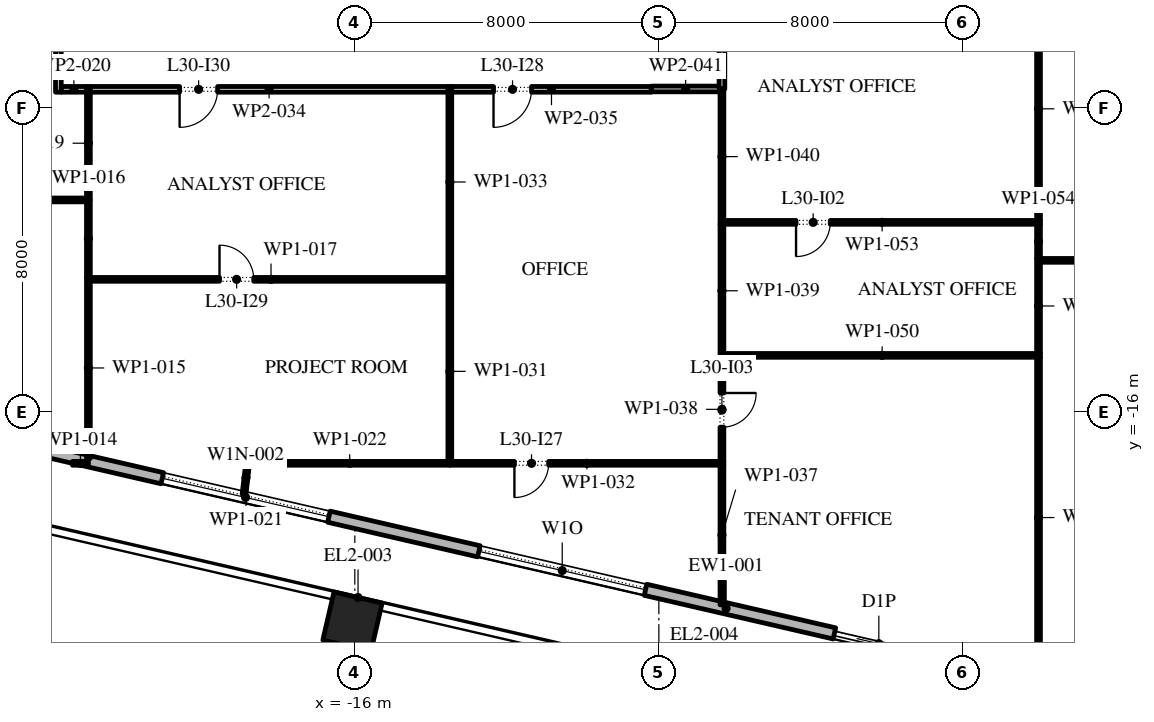
"""IFC4 building model, lengths in metres.
Left out: names, types, materials, properties, quantities, classifications, styles, units other than length and angle.
Written with IfcOpenShell. Run it as: python <this file> out.ifc"""

import sys

from ifc_helpers import new_model, si_unit, direction, frame, frame_2d, origin, origin_2d, place, context, subcontext, project, spatial, rectangle, extrude, element, fill, save


model = new_model("IFC4")
c1 = context("Model", 3, precision=1e-05, world=origin(), true_north=direction((0.0, 1.0)))
c2 = subcontext(c1, "Body", "Model", "MODEL_VIEW")
j1 = project(units=[si_unit("LENGTHUNIT", "METRE"), si_unit("PLANEANGLEUNIT", "RADIAN")], contexts=[c1])
p1 = place(None, origin())
s1 = spatial("IfcSite", under=j1, at=p1, CompositionType="ELEMENT")
p2 = place(p1, origin())
s2 = spatial("IfcBuilding", under=s1, at=p2, CompositionType="ELEMENT")
p3 = place(p2, frame((0.0, 0.0, 139.2)))
s3 = spatial("IfcBuildingStorey", under=s2, at=p3, CompositionType="ELEMENT", Elevation=139.2)
p4 = place(p3, frame((-16.061, -21.505, 0.0), z_axis=(0.0, 0.0, 1.0), x_axis=(0.974370064785, -0.224951054344, 0.0)))
e1 = element("IfcColumn", 1, at=p4, inside=s3, PredefinedType="COLUMN", context=c2, shape_type="SweptSolid", body=[
    extrude(rectangle(XDim=1.3, YDim=1.3, at=origin_2d()), origin(), (0.0, 0.0, 1.0), 4.2),
])
p5 = place(p3, frame((-31.078, -15.421, 0.0), z_axis=(0.0, 0.0, 1.0), x_axis=(0.974370456532, -0.224949357493, 0.0)))
e2 = element("IfcWall", 2, at=p5, inside=s3, PredefinedType="STANDARD", context=c2, shape_type="SweptSolid", body=[
    extrude(rectangle(XDim=51.0, YDim=0.3, at=frame_2d((25.5, 0.0))), origin(), (0.0, 0.0, 1.0), 4.0),
])
p6 = place(p5, frame((1.875, 0.0, 0.45)))
e3 = element("IfcOpeningElement", 3, at=p6, cuts=e2, PredefinedType="OPENING", context=c2, shape_type="SweptSolid", body=[
    extrude(rectangle(XDim=4.5, YDim=2.65, at=frame_2d((2.25, 1.325))), frame((0.0, 0.16, 0.0), z_axis=(0.0, -1.0, 0.0), x_axis=(1.0, 0.0, 0.0)), (0.0, 0.0, 1.0), 0.32),
])
p7 = place(p5, frame((10.275, 0.0, 0.45)))
e4 = element("IfcOpeningElement", 4, at=p7, cuts=e2, PredefinedType="OPENING", context=c2, shape_type="SweptSolid", body=[
    extrude(rectangle(XDim=4.5, YDim=2.525, at=frame_2d((2.25, 1.262))), frame((0.0, 0.16, 0.0), z_axis=(0.0, -1.0, 0.0), x_axis=(1.0, 0.0, 0.0)), (0.0, 0.0, 1.0), 0.32),
])
p8 = place(p5, frame((18.825, 0.0, 0.45)))
e5 = element("IfcOpeningElement", 5, at=p8, cuts=e2, PredefinedType="OPENING", context=c2, shape_type="SweptSolid", body=[
    extrude(rectangle(XDim=4.5, YDim=2.5, at=frame_2d((2.25, 1.25))), frame((0.0, 0.16, 0.0), z_axis=(0.0, -1.0, 0.0), x_axis=(1.0, 0.0, 0.0)), (0.0, 0.0, 1.0), 0.32),
])
p9 = place(p5, frame((28.425, 0.0, 0.0)))
e6 = element("IfcOpeningElement", 6, at=p9, cuts=e2, PredefinedType="OPENING", context=c2, shape_type="SweptSolid", body=[
    extrude(rectangle(XDim=2.4, YDim=2.9, at=frame_2d((1.2, 1.45))), frame((0.0, 0.16, 0.0), z_axis=(0.0, -1.0, 0.0), x_axis=(1.0, 0.0, 0.0)), (0.0, 0.0, 1.0), 0.32),
])
p10 = place(p5, frame((35.925, 0.0, 0.45)))
e7 = element("IfcOpeningElement", 7, at=p10, cuts=e2, PredefinedType="OPENING", context=c2, shape_type="SweptSolid", body=[
    extrude(rectangle(XDim=4.5, YDim=2.45, at=frame_2d((2.25, 1.225))), frame((0.0, 0.16, 0.0), z_axis=(0.0, -1.0, 0.0), x_axis=(1.0, 0.0, 0.0)), (0.0, 0.0, 1.0), 0.32),
])
p11 = place(p5, frame((44.475, 0.0, 0.45)))
e8 = element("IfcOpeningElement", 8, at=p11, cuts=e2, PredefinedType="OPENING", context=c2, shape_type="SweptSolid", body=[
    extrude(rectangle(XDim=4.5, YDim=2.45, at=frame_2d((2.25, 1.225))), frame((0.0, 0.16, 0.0), z_axis=(0.0, -1.0, 0.0), x_axis=(1.0, 0.0, 0.0)), (0.0, 0.0, 1.0), 0.32),
])
p12 = place(p3, frame((-22.82, 37.016, 0.0), z_axis=(0.0, 0.0, 1.0), x_axis=(-0.224953880882, -0.974369412223, 0.0)))
e9 = element("IfcWall", 9, at=p12, inside=s3, PredefinedType="STANDARD", context=c2, shape_type="SweptSolid", body=[
    extrude(rectangle(XDim=49.5, YDim=0.3, at=frame_2d((24.75, 0.0))), origin(), (0.0, 0.0, 1.0), 4.0),
])
p13 = place(p12, frame((1.157, 0.0, 0.45)))
e10 = element("IfcOpeningElement", 10, at=p13, cuts=e9, PredefinedType="OPENING", context=c2, shape_type="SweptSolid", body=[
    extrude(rectangle(XDim=4.5, YDim=3.05, at=frame_2d((2.25, 1.525))), frame((0.0, 0.16, 0.0), z_axis=(0.0, -1.0, 0.0), x_axis=(1.0, 0.0, 0.0)), (0.0, 0.0, 1.0), 0.32),
])
p14 = place(p12, frame((8.121, 0.0, 0.45)))
e11 = element("IfcOpeningElement", 11, at=p14, cuts=e9, PredefinedType="OPENING", context=c2, shape_type="SweptSolid", body=[
    extrude(rectangle(XDim=4.5, YDim=3.05, at=frame_2d((2.25, 1.525))), frame((0.0, 0.16, 0.0), z_axis=(0.0, -1.0, 0.0), x_axis=(1.0, 0.0, 0.0)), (0.0, 0.0, 1.0), 0.32),
])
p15 = place(p12, frame((15.236, 0.0, 0.45)))
e12 = element("IfcOpeningElement", 12, at=p15, cuts=e9, PredefinedType="OPENING", context=c2, shape_type="SweptSolid", body=[
    extrude(rectangle(XDim=4.5, YDim=3.05, at=frame_2d((2.25, 1.525))), frame((0.0, 0.16, 0.0), z_axis=(0.0, -1.0, 0.0), x_axis=(1.0, 0.0, 0.0)), (0.0, 0.0, 1.0), 0.32),
])
p16 = place(p12, frame((23.4, 0.0, 0.0)))
e13 = element("IfcOpeningElement", 13, at=p16, cuts=e9, PredefinedType="OPENING", context=c2, shape_type="SweptSolid", body=[
    extrude(rectangle(XDim=2.4, YDim=3.5, at=frame_2d((1.2, 1.75))), frame((0.0, 0.16, 0.0), z_axis=(0.0, -1.0, 0.0), x_axis=(1.0, 0.0, 0.0)), (0.0, 0.0, 1.0), 0.32),
])
p17 = place(p12, frame((29.464, 0.0, 0.45)))
e14 = element("IfcOpeningElement", 14, at=p17, cuts=e9, PredefinedType="OPENING", context=c2, shape_type="SweptSolid", body=[
    extrude(rectangle(XDim=4.5, YDim=2.875, at=frame_2d((2.25, 1.438))), frame((0.0, 0.16, 0.0), z_axis=(0.0, -1.0, 0.0), x_axis=(1.0, 0.0, 0.0)), (0.0, 0.0, 1.0), 0.32),
])
p18 = place(p12, frame((36.579, 0.0, 0.45)))
e15 = element("IfcOpeningElement", 15, at=p18, cuts=e9, PredefinedType="OPENING", context=c2, shape_type="SweptSolid", body=[
    extrude(rectangle(XDim=4.5, YDim=2.675, at=frame_2d((2.25, 1.337))), frame((0.0, 0.16, 0.0), z_axis=(0.0, -1.0, 0.0), x_axis=(1.0, 0.0, 0.0)), (0.0, 0.0, 1.0), 0.32),
])
p19 = place(p12, frame((43.693, 0.0, 0.45)))
e16 = element("IfcOpeningElement", 16, at=p19, cuts=e9, PredefinedType="OPENING", context=c2, shape_type="SweptSolid", body=[
    extrude(rectangle(XDim=4.5, YDim=3.05, at=frame_2d((2.25, 1.525))), frame((0.0, 0.16, 0.0), z_axis=(0.0, -1.0, 0.0), x_axis=(1.0, 0.0, 0.0)), (0.0, 0.0, 1.0), 0.32),
])
p20 = place(p3, frame((-23.8, -7.575, 0.0), z_axis=(0.0, 0.0, 1.0), x_axis=(0.0, 1.0, 0.0)))
e17 = element("IfcWall", 17, at=p20, inside=s3, PredefinedType="PARTITIONING", context=c2, shape_type="SweptSolid", body=[
    extrude(rectangle(XDim=3.255, YDim=0.15, at=frame_2d((1.627, 0.0))), origin(), (0.0, 0.0, 1.0), 4.0),
])
p21 = place(p20, frame((1.105, 0.0, 0.0)))
e18 = element("IfcOpeningElement", 18, at=p21, cuts=e17, PredefinedType="OPENING", context=c2, shape_type="SweptSolid", body=[
    extrude(rectangle(XDim=1.0, YDim=2.1, at=frame_2d((0.5, 1.05))), frame((0.0, 0.085, 0.0), z_axis=(0.0, -1.0, 0.0), x_axis=(1.0, 0.0, 0.0)), (0.0, 0.0, 1.0), 0.17),
])
p22 = place(p3, frame((-23.43, -17.34, 0.0), z_axis=(0.0, 0.0, 1.0), x_axis=(1.0, 0.0, 0.0)))
e19 = element("IfcWall", 19, at=p22, inside=s3, PredefinedType="PARTITIONING", context=c2, shape_type="SweptSolid", body=[
    extrude(rectangle(XDim=0.42, YDim=0.1, at=frame_2d((0.21, 0.0))), origin(), (0.0, 0.0, 1.0), 4.0),
])
p23 = place(p3, frame((-23.01, -17.212, 0.0), z_axis=(0.0, 0.0, 1.0), x_axis=(0.0, 1.0, 0.0)))
e20 = element("IfcWall", 20, at=p23, inside=s3, PredefinedType="PARTITIONING", context=c2, shape_type="SweptSolid", body=[
    extrude(rectangle(XDim=4.762, YDim=0.1, at=frame_2d((2.381, 0.0))), origin(), (0.0, 0.0, 1.0), 4.0),
])
p24 = place(p3, frame((-23.01, -12.45, 0.0), z_axis=(0.0, 0.0, 1.0), x_axis=(0.0, 1.0, 0.0)))
e21 = element("IfcWall", 21, at=p24, inside=s3, PredefinedType="PARTITIONING", context=c2, shape_type="SweptSolid", body=[
    extrude(rectangle(XDim=2.04, YDim=0.1, at=frame_2d((1.02, 0.0))), origin(), (0.0, 0.0, 1.0), 4.0),
])
p25 = place(p3, frame((-22.96, -12.5, 0.0), z_axis=(0.0, 0.0, 1.0), x_axis=(1.0, 0.0, 0.0)))
e22 = element("IfcWall", 22, at=p25, inside=s3, PredefinedType="PARTITIONING", context=c2, shape_type="SweptSolid", body=[
    extrude(rectangle(XDim=9.51, YDim=0.1, at=frame_2d((4.755, 0.0))), origin(), (0.0, 0.0, 1.0), 4.0),
])
p26 = place(p25, frame((3.4, 0.0, 0.0)))
e23 = element("IfcOpeningElement", 23, at=p26, cuts=e22, PredefinedType="OPENING", context=c2, shape_type="SweptSolid", body=[
    extrude(rectangle(XDim=0.9, YDim=2.1, at=frame_2d((0.45, 1.05))), frame((0.0, 0.06, 0.0), z_axis=(0.0, -1.0, 0.0), x_axis=(1.0, 0.0, 0.0)), (0.0, 0.0, 1.0), 0.12),
])
p27 = place(p3, frame((-23.06, -10.41, 0.0), z_axis=(0.0, 0.0, 1.0), x_axis=(-1.0, 0.0, 0.0)))
e24 = element("IfcWall", 24, at=p27, inside=s3, PredefinedType="PARTITIONING", context=c2, shape_type="SweptSolid", body=[
    extrude(rectangle(XDim=8.97, YDim=0.1, at=frame_2d((4.485, 0.0))), origin(), (0.0, 0.0, 1.0), 4.0),
])
p28 = place(p27, frame((3.92, 0.0, 0.0)))
e25 = element("IfcOpeningElement", 25, at=p28, cuts=e24, PredefinedType="OPENING", context=c2, shape_type="SweptSolid", body=[
    extrude(rectangle(XDim=0.9, YDim=2.1, at=frame_2d((0.45, 1.05))), frame((0.0, 0.06, 0.0), z_axis=(0.0, -1.0, 0.0), x_axis=(1.0, 0.0, 0.0)), (0.0, 0.0, 1.0), 0.12),
])
p29 = place(p3, frame((-23.01, -10.41, 0.0), z_axis=(0.0, 0.0, 1.0), x_axis=(0.0, 1.0, 0.0)))
e26 = element("IfcWall", 26, at=p29, inside=s3, PredefinedType="PARTITIONING", context=c2, shape_type="SweptSolid", body=[
    extrude(rectangle(XDim=2.985, YDim=0.1, at=frame_2d((1.492, 0.0))), origin(), (0.0, 0.0, 1.0), 4.0),
])
p30 = place(p3, frame((-23.06, -7.5, 0.0), z_axis=(0.0, 0.0, 1.0), x_axis=(-1.0, 0.0, 0.0)))
e27 = element("IfcWall", 27, at=p30, inside=s3, PredefinedType="PARTITIONING", context=c2, shape_type="SweptSolid", body=[
    extrude(rectangle(XDim=0.665, YDim=0.15, at=frame_2d((0.333, 0.0))), origin(), (0.0, 0.0, 1.0), 4.0),
])
p31 = place(p3, frame((-18.915, -18.157, 0.0), z_axis=(0.0, 0.0, 1.0), x_axis=(0.11580251051, 0.993272258024, 0.0)))
e28 = element("IfcWall", 28, at=p31, inside=s3, PredefinedType="PARTITIONING", context=c2, shape_type="SweptSolid", body=[
    extrude(rectangle(XDim=0.873, YDim=0.1, at=frame_2d((0.437, 0.0))), origin(), (0.0, 0.0, 1.0), 4.0),
])
p32 = place(p3, frame((-18.77, -17.34, 0.0), z_axis=(0.0, 0.0, 1.0), x_axis=(1.0, 0.0, 0.0)))
e29 = element("IfcWall", 29, at=p32, inside=s3, PredefinedType="PARTITIONING", context=c2, shape_type="SweptSolid", body=[
    extrude(rectangle(XDim=5.27, YDim=0.1, at=frame_2d((2.635, 0.0))), origin(), (0.0, 0.0, 1.0), 4.0),
])
p33 = place(p3, frame((-13.5, -17.29, 0.0), z_axis=(0.0, 0.0, 1.0), x_axis=(0.0, 1.0, 0.0)))
e30 = element("IfcWall", 30, at=p33, inside=s3, PredefinedType="PARTITIONING", context=c2, shape_type="SweptSolid", body=[
    extrude(rectangle(XDim=4.74, YDim=0.1, at=frame_2d((2.37, 0.0))), origin(), (0.0, 0.0, 1.0), 4.0),
])
p34 = place(p3, frame((-13.5, -17.34, 0.0), z_axis=(0.0, 0.0, 1.0), x_axis=(1.0, 0.0, 0.0)))
e31 = element("IfcWall", 31, at=p34, inside=s3, PredefinedType="PARTITIONING", context=c2, shape_type="SweptSolid", body=[
    extrude(rectangle(XDim=7.21, YDim=0.1, at=frame_2d((3.605, 0.0))), origin(), (0.0, 0.0, 1.0), 4.0),
])
p35 = place(p34, frame((1.7, 0.0, 0.0)))
e32 = element("IfcOpeningElement", 32, at=p35, cuts=e31, PredefinedType="OPENING", context=c2, shape_type="SweptSolid", body=[
    extrude(rectangle(XDim=0.9, YDim=2.1, at=frame_2d((0.45, 1.05))), frame((0.0, 0.06, 0.0), z_axis=(0.0, -1.0, 0.0), x_axis=(1.0, 0.0, 0.0)), (0.0, 0.0, 1.0), 0.12),
])
p36 = place(p3, frame((-13.5, -12.45, 0.0), z_axis=(0.0, 0.0, 1.0), x_axis=(0.0, 1.0, 0.0)))
e33 = element("IfcWall", 33, at=p36, inside=s3, PredefinedType="PARTITIONING", context=c2, shape_type="SweptSolid", body=[
    extrude(rectangle(XDim=5.025, YDim=0.1, at=frame_2d((2.512, 0.0))), origin(), (0.0, 0.0, 1.0), 4.0),
])
p37 = place(p3, frame((-13.55, -7.5, 0.0), z_axis=(0.0, 0.0, 1.0), x_axis=(-1.0, 0.0, 0.0)))
e34 = element("IfcWall", 34, at=p37, inside=s3, PredefinedType="PARTITIONING", context=c2, shape_type="SweptSolid", body=[
    extrude(rectangle(XDim=9.41, YDim=0.15, at=frame_2d((4.705, 0.0))), origin(), (0.0, 0.0, 1.0), 4.0),
])
p38 = place(p37, frame((6.06, 0.0, 0.0)))
e35 = element("IfcOpeningElement", 35, at=p38, cuts=e34, PredefinedType="OPENING", context=c2, shape_type="SweptSolid", body=[
    extrude(rectangle(XDim=1.0, YDim=2.1, at=frame_2d((0.5, 1.05))), frame((0.0, 0.085, 0.0), z_axis=(0.0, -1.0, 0.0), x_axis=(1.0, 0.0, 0.0)), (0.0, 0.0, 1.0), 0.17),
])
p39 = place(p3, frame((-8.2, -7.5, 0.0), z_axis=(0.0, 0.0, 1.0), x_axis=(-1.0, 0.0, 0.0)))
e36 = element("IfcWall", 36, at=p39, inside=s3, PredefinedType="PARTITIONING", context=c2, shape_type="SweptSolid", body=[
    extrude(rectangle(XDim=5.25, YDim=0.15, at=frame_2d((2.625, 0.0))), origin(), (0.0, 0.0, 1.0), 4.0),
])
p40 = place(p39, frame((3.15, 0.0, 0.0)))
e37 = element("IfcOpeningElement", 37, at=p40, cuts=e36, PredefinedType="OPENING", context=c2, shape_type="SweptSolid", body=[
    extrude(rectangle(XDim=1.0, YDim=2.1, at=frame_2d((0.5, 1.05))), frame((0.0, 0.085, 0.0), z_axis=(0.0, -1.0, 0.0), x_axis=(1.0, 0.0, 0.0)), (0.0, 0.0, 1.0), 0.17),
])
p41 = place(p3, frame((-6.34, -21.061, 0.0), z_axis=(0.0, 0.0, 1.0), x_axis=(0.0, 1.0, 0.0)))
e38 = element("IfcWall", 38, at=p41, inside=s3, PredefinedType="PARTITIONING", context=c2, shape_type="SweptSolid", body=[
    extrude(rectangle(XDim=3.671, YDim=0.1, at=frame_2d((1.835, 0.0))), origin(), (0.0, 0.0, 1.0), 4.0),
])
p42 = place(p3, frame((-6.34, -17.29, 0.0), z_axis=(0.0, 0.0, 1.0), x_axis=(0.0, 1.0, 0.0)))
e39 = element("IfcWall", 39, at=p42, inside=s3, PredefinedType="PARTITIONING", context=c2, shape_type="SweptSolid", body=[
    extrude(rectangle(XDim=2.74, YDim=0.1, at=frame_2d((1.37, 0.0))), origin(), (0.0, 0.0, 1.0), 4.0),
])
p43 = place(p42, frame((0.9, 0.0, 0.0)))
e40 = element("IfcOpeningElement", 40, at=p43, cuts=e39, PredefinedType="OPENING", context=c2, shape_type="SweptSolid", body=[
    extrude(rectangle(XDim=0.9, YDim=2.1, at=frame_2d((0.45, 1.05))), frame((0.0, 0.06, 0.0), z_axis=(0.0, -1.0, 0.0), x_axis=(1.0, 0.0, 0.0)), (0.0, 0.0, 1.0), 0.12),
])
p44 = place(p3, frame((-6.34, -14.55, 0.0), z_axis=(0.0, 0.0, 1.0), x_axis=(0.0, 1.0, 0.0)))
e41 = element("IfcWall", 41, at=p44, inside=s3, PredefinedType="PARTITIONING", context=c2, shape_type="SweptSolid", body=[
    extrude(rectangle(XDim=3.5, YDim=0.1, at=frame_2d((1.75, 0.0))), origin(), (0.0, 0.0, 1.0), 4.0),
])
p45 = place(p3, frame((-6.34, -11.05, 0.0), z_axis=(0.0, 0.0, 1.0), x_axis=(0.0, 1.0, 0.0)))
e42 = element("IfcWall", 42, at=p45, inside=s3, PredefinedType="PARTITIONING", context=c2, shape_type="SweptSolid", body=[
    extrude(rectangle(XDim=3.56, YDim=0.1, at=frame_2d((1.78, 0.0))), origin(), (0.0, 0.0, 1.0), 4.0),
])
p46 = place(p3, frame((-6.39, -7.49, 0.0), z_axis=(0.0, 0.0, 1.0), x_axis=(-1.0, 0.0, 0.0)))
e43 = element("IfcWall", 43, at=p46, inside=s3, PredefinedType="PARTITIONING", context=c2, shape_type="SweptSolid", body=[
    extrude(rectangle(XDim=1.81, YDim=0.15, at=frame_2d((0.905, 0.0))), origin(), (0.0, 0.0, 1.0), 4.0),
])
p47 = place(p3, frame((-6.34, -4.925, 0.0), z_axis=(0.0, 0.0, 1.0), x_axis=(0.0, -1.0, 0.0)))
e44 = element("IfcWall", 44, at=p47, inside=s3, PredefinedType="PARTITIONING", context=c2, shape_type="SweptSolid", body=[
    extrude(rectangle(XDim=2.565, YDim=0.15, at=frame_2d((1.282, 0.0))), origin(), (0.0, 0.0, 1.0), 4.0),
])
p48 = place(p3, frame((2.04, -14.5, 0.0), z_axis=(0.0, 0.0, 1.0), x_axis=(-1.0, 0.0, 0.0)))
e45 = element("IfcWall", 45, at=p48, inside=s3, PredefinedType="PARTITIONING", context=c2, shape_type="SweptSolid", body=[
    extrude(rectangle(XDim=8.33, YDim=0.1, at=frame_2d((4.165, 0.0))), origin(), (0.0, 0.0, 1.0), 4.0),
])
p49 = place(p3, frame((1.99, -14.55, 0.0), z_axis=(0.0, 0.0, 1.0), x_axis=(0.0, -1.0, 0.0)))
e46 = element("IfcWall", 46, at=p49, inside=s3, PredefinedType="PARTITIONING", context=c2, shape_type="SweptSolid", body=[
    extrude(rectangle(XDim=8.434, YDim=0.1, at=frame_2d((4.217, 0.0))), origin(), (0.0, 0.0, 1.0), 4.0),
])
p50 = place(p3, frame((1.99, -11.95, 0.0), z_axis=(0.0, 0.0, 1.0), x_axis=(0.0, -1.0, 0.0)))
e47 = element("IfcWall", 47, at=p50, inside=s3, PredefinedType="PARTITIONING", context=c2, shape_type="SweptSolid", body=[
    extrude(rectangle(XDim=2.5, YDim=0.1, at=frame_2d((1.25, 0.0))), origin(), (0.0, 0.0, 1.0), 4.0),
])
p51 = place(p3, frame((2.04, -11.0, 0.0), z_axis=(0.0, 0.0, 1.0), x_axis=(-1.0, 0.0, 0.0)))
e48 = element("IfcWall", 48, at=p51, inside=s3, PredefinedType="PARTITIONING", context=c2, shape_type="SweptSolid", body=[
    extrude(rectangle(XDim=8.33, YDim=0.1, at=frame_2d((4.165, 0.0))), origin(), (0.0, 0.0, 1.0), 4.0),
])
p52 = place(p51, frame((5.53, 0.0, 0.0)))
e49 = element("IfcOpeningElement", 49, at=p52, cuts=e48, PredefinedType="OPENING", context=c2, shape_type="SweptSolid", body=[
    extrude(rectangle(XDim=0.9, YDim=2.1, at=frame_2d((0.45, 1.05))), frame((0.0, 0.06, 0.0), z_axis=(0.0, -1.0, 0.0), x_axis=(1.0, 0.0, 0.0)), (0.0, 0.0, 1.0), 0.12),
])
p53 = place(p3, frame((1.99, -11.05, 0.0), z_axis=(0.0, 0.0, 1.0), x_axis=(0.0, -1.0, 0.0)))
e50 = element("IfcWall", 50, at=p53, inside=s3, PredefinedType="PARTITIONING", context=c2, shape_type="SweptSolid", body=[
    extrude(rectangle(XDim=0.9, YDim=0.1, at=frame_2d((0.45, 0.0))), origin(), (0.0, 0.0, 1.0), 4.0),
])
p54 = place(p3, frame((1.99, -5.075, 0.0), z_axis=(0.0, 0.0, 1.0), x_axis=(0.0, -1.0, 0.0)))
e51 = element("IfcWall", 51, at=p54, inside=s3, PredefinedType="PARTITIONING", context=c2, shape_type="SweptSolid", body=[
    extrude(rectangle(XDim=5.875, YDim=0.1, at=frame_2d((2.938, 0.0))), origin(), (0.0, 0.0, 1.0), 4.0),
])
p55 = place(p3, frame((14.72, -12.0, 0.0), z_axis=(0.0, 0.0, 1.0), x_axis=(-1.0, 0.0, 0.0)))
e52 = element("IfcWall", 52, at=p55, inside=s3, PredefinedType="PARTITIONING", context=c2, shape_type="SweptSolid", body=[
    extrude(rectangle(XDim=12.68, YDim=0.1, at=frame_2d((6.34, 0.0))), origin(), (0.0, 0.0, 1.0), 4.0),
])
p56 = place(p55, frame((5.88, 0.0, 0.0)))
e53 = element("IfcOpeningElement", 53, at=p56, cuts=e52, PredefinedType="OPENING", context=c2, shape_type="SweptSolid", body=[
    extrude(rectangle(XDim=0.9, YDim=2.1, at=frame_2d((0.45, 1.05))), frame((0.0, 0.06, 0.0), z_axis=(0.0, -1.0, 0.0), x_axis=(1.0, 0.0, 0.0)), (0.0, 0.0, 1.0), 0.12),
])
p57 = place(p7, origin())
e54 = element("IfcWindow", 54, at=p57, inside=s3, PartitioningType="DOUBLE_PANEL_VERTICAL", PredefinedType="WINDOW", context=c2, shape_type="SweptSolid", body=[
    extrude(rectangle(XDim=4.5, YDim=2.525, at=frame_2d((2.25, 1.262))), frame((0.0, 0.03, 0.0), z_axis=(0.0, -1.0, 0.0), x_axis=(1.0, 0.0, 0.0)), (0.0, 0.0, 1.0), 0.06),
])
fill(e4, e54)
p58 = place(p8, origin())
e55 = element("IfcWindow", 55, at=p58, inside=s3, PartitioningType="DOUBLE_PANEL_VERTICAL", PredefinedType="WINDOW", context=c2, shape_type="SweptSolid", body=[
    extrude(rectangle(XDim=4.5, YDim=2.5, at=frame_2d((2.25, 1.25))), frame((0.0, 0.03, 0.0), z_axis=(0.0, -1.0, 0.0), x_axis=(1.0, 0.0, 0.0)), (0.0, 0.0, 1.0), 0.06),
])
fill(e5, e55)
p59 = place(p9, origin())
e56 = element("IfcDoor", 56, at=p59, inside=s3, OperationType="DOUBLE_DOOR_SLIDING", PredefinedType="DOOR", context=c2, shape_type="SweptSolid", body=[
    extrude(rectangle(XDim=2.4, YDim=2.9, at=frame_2d((1.2, 1.45))), frame((0.0, 0.025, 0.0), z_axis=(0.0, -1.0, 0.0), x_axis=(1.0, 0.0, 0.0)), (0.0, 0.0, 1.0), 0.05),
])
fill(e6, e56)
p60 = place(p52, origin())
e57 = element("IfcDoor", 57, at=p60, inside=s3, OperationType="SINGLE_SWING_LEFT", PredefinedType="DOOR", context=c2, shape_type="SweptSolid", body=[
    extrude(rectangle(XDim=0.9, YDim=2.1, at=frame_2d((0.45, 1.05))), frame((0.0, 0.025, 0.0), z_axis=(0.0, -1.0, 0.0), x_axis=(1.0, 0.0, 0.0)), (0.0, 0.0, 1.0), 0.05),
])
fill(e49, e57)
p61 = place(p43, frame((0.9, 0.0, 0.0), z_axis=(0.0, 0.0, 1.0), x_axis=(-1.0, 0.0, 0.0)))
e58 = element("IfcDoor", 58, at=p61, inside=s3, OperationType="SINGLE_SWING_RIGHT", PredefinedType="DOOR", context=c2, shape_type="SweptSolid", body=[
    extrude(rectangle(XDim=0.9, YDim=2.1, at=frame_2d((0.45, 1.05))), frame((0.0, 0.025, 0.0), z_axis=(0.0, -1.0, 0.0), x_axis=(1.0, 0.0, 0.0)), (0.0, 0.0, 1.0), 0.05),
])
fill(e40, e58)
p62 = place(p35, frame((0.9, 0.0, 0.0), z_axis=(0.0, 0.0, 1.0), x_axis=(-1.0, 0.0, 0.0)))
e59 = element("IfcDoor", 59, at=p62, inside=s3, OperationType="SINGLE_SWING_LEFT", PredefinedType="DOOR", context=c2, shape_type="SweptSolid", body=[
    extrude(rectangle(XDim=0.9, YDim=2.1, at=frame_2d((0.45, 1.05))), frame((0.0, 0.025, 0.0), z_axis=(0.0, -1.0, 0.0), x_axis=(1.0, 0.0, 0.0)), (0.0, 0.0, 1.0), 0.05),
])
fill(e32, e59)
p63 = place(p40, origin())
e60 = element("IfcDoor", 60, at=p63, inside=s3, OperationType="SINGLE_SWING_LEFT", PredefinedType="DOOR", context=c2, shape_type="SweptSolid", body=[
    extrude(rectangle(XDim=1.0, YDim=2.1, at=frame_2d((0.5, 1.05))), frame((0.0, 0.025, 0.0), z_axis=(0.0, -1.0, 0.0), x_axis=(1.0, 0.0, 0.0)), (0.0, 0.0, 1.0), 0.05),
])
fill(e37, e60)
p64 = place(p26, origin())
e61 = element("IfcDoor", 61, at=p64, inside=s3, OperationType="SINGLE_SWING_RIGHT", PredefinedType="DOOR", context=c2, shape_type="SweptSolid", body=[
    extrude(rectangle(XDim=0.9, YDim=2.1, at=frame_2d((0.45, 1.05))), frame((0.0, 0.025, 0.0), z_axis=(0.0, -1.0, 0.0), x_axis=(1.0, 0.0, 0.0)), (0.0, 0.0, 1.0), 0.05),
])
fill(e23, e61)
p65 = place(p38, origin())
e62 = element("IfcDoor", 62, at=p65, inside=s3, OperationType="SINGLE_SWING_LEFT", PredefinedType="DOOR", context=c2, shape_type="SweptSolid", body=[
    extrude(rectangle(XDim=1.0, YDim=2.1, at=frame_2d((0.5, 1.05))), frame((0.0, 0.025, 0.0), z_axis=(0.0, -1.0, 0.0), x_axis=(1.0, 0.0, 0.0)), (0.0, 0.0, 1.0), 0.05),
])
fill(e35, e62)
save(model, sys.argv[1])
